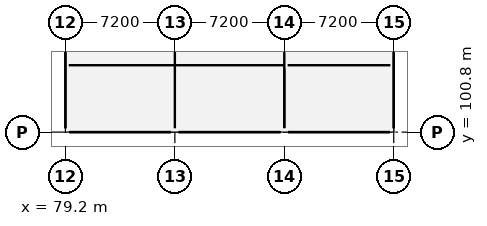
"""IFC4 building model, lengths in metres.
Left out: names, types, materials, properties, quantities, classifications, styles, units other than length and angle.
Written with IfcOpenShell. Run it as: python <this file> out.ifc"""

import sys

from ifc_helpers import new_model, si_unit, direction, frame, frame_2d, origin, origin_2d, place, context, subcontext, project, spatial, rectangle, extrude, element, fill, save


model = new_model("IFC4")
c1 = context("Model", 3, precision=1e-05, world=origin(), true_north=direction((0.0, 1.0)))
c2 = subcontext(c1, "Body", "Model", "MODEL_VIEW")
j1 = project(units=[si_unit("LENGTHUNIT", "METRE"), si_unit("PLANEANGLEUNIT", "RADIAN")], contexts=[c1])
p1 = place(None, origin())
s1 = spatial("IfcSite", under=j1, at=p1, CompositionType="ELEMENT")
p2 = place(p1, origin())
s2 = spatial("IfcBuilding", under=s1, at=p2, CompositionType="ELEMENT")
p3 = place(p2, frame((0.0, 0.0, 21.3)))
s3 = spatial("IfcBuildingStorey", under=s2, at=p3, CompositionType="ELEMENT", Elevation=21.3)
for number, where, z_axis, x_axis in (
    (1, (79.2, 100.8, 0.0), (0.0, 0.0, 1.0), (1.0, 0.0, 0.0)),
    (2, (86.4, 100.8, 0.0), (0.0, 0.0, 1.0), (1.0, 0.0, 0.0)),
    (3, (93.6, 100.8, 0.0), (0.0, 0.0, 1.0), (1.0, 0.0, 0.0)),
    (4, (100.8, 100.8, 0.0), (0.0, 0.0, 1.0), (1.0, 0.0, 0.0)),
):
    element("IfcColumn", number, at=place(p3, frame(where, z_axis=z_axis, x_axis=x_axis)), inside=s3, PredefinedType="COLUMN", context=c2, shape_type="SweptSolid", body=[
        extrude(rectangle(XDim=0.5, YDim=0.5, at=origin_2d()), origin(), (0.0, 0.0, 1.0), 3.9),
    ])
p4 = place(p3, frame((100.8, 101.05, 0.0), z_axis=(0.0, 0.0, 1.0), x_axis=(0.0, 1.0, 0.0)))
e5 = element("IfcWall", 5, at=p4, inside=s3, PredefinedType="ELEMENTEDWALL", context=c2, shape_type="SweptSolid", body=[
    extrude(rectangle(XDim=6.7, YDim=0.28, at=frame_2d((3.35, 0.0))), origin(), (0.0, 0.0, 1.0), 3.04),
])
p5 = place(p4, frame((2.9, 0.0, 0.85)))
e6 = element("IfcOpeningElement", 6, at=p5, cuts=e5, PredefinedType="OPENING", context=c2, shape_type="SweptSolid", body=[
    extrude(rectangle(XDim=0.9, YDim=2.0, at=frame_2d((0.45, 1.0))), frame((0.0, 0.152, 0.0), z_axis=(0.0, -1.0, 0.0), x_axis=(1.0, 0.0, 0.0)), (0.0, 0.0, 1.0), 0.304),
])
p6 = place(p3, frame((79.2, 107.75, 0.0), z_axis=(0.0, 0.0, 1.0), x_axis=(0.0, -1.0, 0.0)))
e7 = element("IfcWall", 7, at=p6, inside=s3, PredefinedType="ELEMENTEDWALL", context=c2, shape_type="SweptSolid", body=[
    extrude(rectangle(XDim=6.7, YDim=0.28, at=frame_2d((3.35, 0.0))), origin(), (0.0, 0.0, 1.0), 3.04),
])
p7 = place(p6, frame((2.9, 0.0, 0.8)))
e8 = element("IfcOpeningElement", 8, at=p7, cuts=e7, PredefinedType="OPENING", context=c2, shape_type="SweptSolid", body=[
    extrude(rectangle(XDim=0.9, YDim=2.0, at=frame_2d((0.45, 1.0))), frame((0.0, 0.152, 0.0), z_axis=(0.0, -1.0, 0.0), x_axis=(1.0, 0.0, 0.0)), (0.0, 0.0, 1.0), 0.304),
])
p8 = place(p3, frame((79.45, 100.8, 0.0), z_axis=(0.0, 0.0, 1.0), x_axis=(1.0, 0.0, 0.0)))
e9 = element("IfcWall", 9, at=p8, inside=s3, PredefinedType="ELEMENTEDWALL", context=c2, shape_type="SweptSolid", body=[
    extrude(rectangle(XDim=6.7, YDim=0.28, at=frame_2d((3.35, 0.0))), origin(), (0.0, 0.0, 1.0), 2.89),
])
p9 = place(p3, frame((86.65, 100.8, 0.0), z_axis=(0.0, 0.0, 1.0), x_axis=(1.0, 0.0, 0.0)))
e10 = element("IfcWall", 10, at=p9, inside=s3, PredefinedType="ELEMENTEDWALL", context=c2, shape_type="SweptSolid", body=[
    extrude(rectangle(XDim=6.7, YDim=0.28, at=frame_2d((3.35, 0.0))), origin(), (0.0, 0.0, 1.0), 2.94),
])
p10 = place(p3, frame((93.85, 100.8, 0.0), z_axis=(0.0, 0.0, 1.0), x_axis=(1.0, 0.0, 0.0)))
e11 = element("IfcWall", 11, at=p10, inside=s3, PredefinedType="ELEMENTEDWALL", context=c2, shape_type="SweptSolid", body=[
    extrude(rectangle(XDim=6.7, YDim=0.28, at=frame_2d((3.35, 0.0))), origin(), (0.0, 0.0, 1.0), 2.89),
])
p11 = place(p3, frame((79.42, 105.2, 0.0), z_axis=(0.0, 0.0, 1.0), x_axis=(1.0, 0.0, 0.0)))
e12 = element("IfcWall", 12, at=p11, inside=s3, PredefinedType="PARTITIONING", context=c2, shape_type="SweptSolid", body=[
    extrude(rectangle(XDim=14.18, YDim=0.12, at=frame_2d((7.09, 0.0))), origin(), (0.0, 0.0, 1.0), 3.038),
])
p12 = place(p11, frame((6.59, 0.0, 0.0)))
e13 = element("IfcOpeningElement", 13, at=p12, cuts=e12, PredefinedType="OPENING", context=c2, shape_type="SweptSolid", body=[
    extrude(rectangle(XDim=1.0, YDim=2.15, at=frame_2d((0.5, 1.075))), frame((0.0, 0.072, 0.0), z_axis=(0.0, -1.0, 0.0), x_axis=(1.0, 0.0, 0.0)), (0.0, 0.0, 1.0), 0.144),
])
p13 = place(p3, frame((93.6, 101.09, 0.0), z_axis=(0.0, 0.0, 1.0), x_axis=(0.0, 1.0, 0.0)))
e14 = element("IfcWall", 14, at=p13, inside=s3, PredefinedType="PARTITIONING", context=c2, shape_type="SweptSolid", body=[
    extrude(rectangle(XDim=3.89, YDim=0.12, at=frame_2d((1.945, 0.0))), origin(), (0.0, 0.0, 1.0), 3.038),
])
p14 = place(p3, frame((93.82, 105.2, 0.0), z_axis=(0.0, 0.0, 1.0), x_axis=(1.0, 0.0, 0.0)))
e15 = element("IfcWall", 15, at=p14, inside=s3, PredefinedType="PLUMBINGWALL", context=c2, shape_type="SweptSolid", body=[
    extrude(rectangle(XDim=6.76, YDim=0.18, at=frame_2d((3.38, 0.0))), origin(), (0.0, 0.0, 1.0), 3.62),
])
p15 = place(p14, frame((2.93, 0.0, 0.0)))
e16 = element("IfcOpeningElement", 16, at=p15, cuts=e15, PredefinedType="OPENING", context=c2, shape_type="SweptSolid", body=[
    extrude(rectangle(XDim=0.9, YDim=2.1, at=frame_2d((0.45, 1.05))), frame((0.0, 0.102, 0.0), z_axis=(0.0, -1.0, 0.0), x_axis=(1.0, 0.0, 0.0)), (0.0, 0.0, 1.0), 0.204),
])
p16 = place(p5, origin())
e17 = element("IfcWindow", 17, at=p16, inside=s3, PartitioningType="SINGLE_PANEL", PredefinedType="WINDOW", context=c2, shape_type="SweptSolid", body=[
    extrude(rectangle(XDim=0.9, YDim=2.0, at=frame_2d((0.45, 1.0))), frame((0.0, 0.03, 0.0), z_axis=(0.0, -1.0, 0.0), x_axis=(1.0, 0.0, 0.0)), (0.0, 0.0, 1.0), 0.06),
])
fill(e6, e17)
p17 = place(p7, origin())
e18 = element("IfcWindow", 18, at=p17, inside=s3, PartitioningType="SINGLE_PANEL", PredefinedType="WINDOW", context=c2, shape_type="SweptSolid", body=[
    extrude(rectangle(XDim=0.9, YDim=2.0, at=frame_2d((0.45, 1.0))), frame((0.0, 0.03, 0.0), z_axis=(0.0, -1.0, 0.0), x_axis=(1.0, 0.0, 0.0)), (0.0, 0.0, 1.0), 0.06),
])
fill(e8, e18)
p18 = place(p12, origin())
e19 = element("IfcDoor", 19, at=p18, inside=s3, OperationType="SINGLE_SWING_RIGHT", PredefinedType="DOOR", context=c2, shape_type="SweptSolid", body=[
    extrude(rectangle(XDim=1.0, YDim=2.15, at=frame_2d((0.5, 1.075))), frame((0.0, 0.025, 0.0), z_axis=(0.0, -1.0, 0.0), x_axis=(1.0, 0.0, 0.0)), (0.0, 0.0, 1.0), 0.05),
])
fill(e13, e19)
p19 = place(p15, origin())
e20 = element("IfcDoor", 20, at=p19, inside=s3, OperationType="SINGLE_SWING_LEFT", PredefinedType="DOOR", context=c2, shape_type="SweptSolid", body=[
    extrude(rectangle(XDim=0.9, YDim=2.1, at=frame_2d((0.45, 1.05))), frame((0.0, 0.025, 0.0), z_axis=(0.0, -1.0, 0.0), x_axis=(1.0, 0.0, 0.0)), (0.0, 0.0, 1.0), 0.05),
])
fill(e16, e20)
save(model, sys.argv[1])
